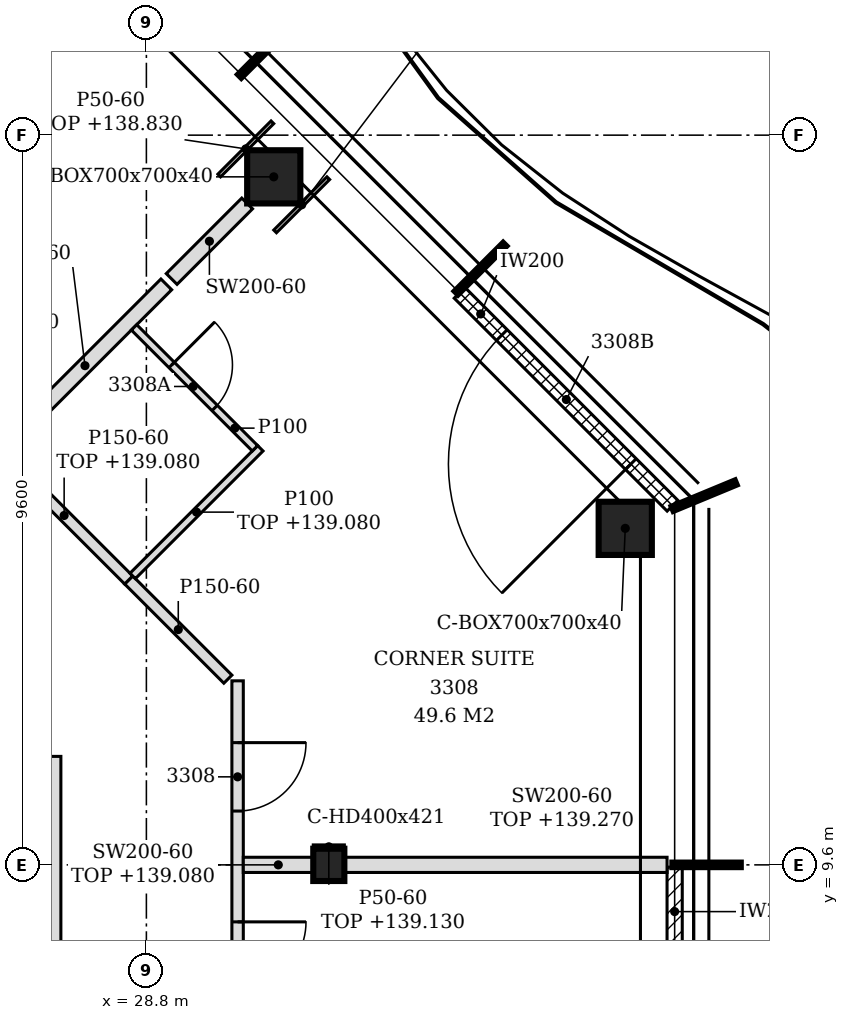
"""IFC4 building model, lengths in metres.
Left out: names, types, materials, properties, quantities, classifications, styles, units other than length and angle.
Written with IfcOpenShell. Run it as: python <this file> out.ifc"""

import sys

from ifc_helpers import new_model, si_unit, direction, frame, frame_2d, origin, origin_2d, place, context, subcontext, project, spatial, polyline, rectangle, hollow_rectangle, i_section, outline, extrude, element, fill, save


model = new_model("IFC4")
c1 = context("Model", 3, precision=1e-05, world=origin(), true_north=direction((0.0, 1.0)))
c2 = subcontext(c1, "Body", "Model", "MODEL_VIEW")
j1 = project(units=[si_unit("LENGTHUNIT", "METRE"), si_unit("PLANEANGLEUNIT", "RADIAN")], contexts=[c1])
p1 = place(None, origin())
s1 = spatial("IfcSite", under=j1, at=p1, CompositionType="ELEMENT")
p2 = place(p1, origin())
s2 = spatial("IfcBuilding", under=s1, at=p2, CompositionType="ELEMENT")
p3 = place(p2, frame((0.0, 0.0, 136.2)))
s3 = spatial("IfcBuildingStorey", under=s2, at=p3, CompositionType="ELEMENT", Elevation=136.2)
for number, where, z_axis, x_axis in (
    (1, (35.1, 14.027, -0.15), (0.0, 0.0, 1.0), (1.0, 0.0, 0.0)),
    (2, (30.476, 18.652, -0.15), (0.0, 0.0, 1.0), (1.0, 0.0, 0.0)),
):
    element("IfcColumn", number, at=place(p3, frame(where, z_axis=z_axis, x_axis=x_axis)), inside=s3, PredefinedType="COLUMN", context=c2, shape_type="SweptSolid", body=[
        extrude(hollow_rectangle(XDim=0.7, YDim=0.7, WallThickness=0.04, at=origin_2d()), origin(), (0.0, 0.0, 1.0), 3.6),
    ])
p4 = place(p3, frame((31.2, 9.6, -0.15), z_axis=(0.0, 0.0, 1.0), x_axis=(1.0, 0.0, 0.0)))
e3 = element("IfcColumn", 3, at=p4, inside=s3, PredefinedType="COLUMN", context=c2, shape_type="SweptSolid", body=[
    extrude(i_section(OverallWidth=0.409, OverallDepth=0.425, WebThickness=0.033, FlangeThickness=0.052, FilletRadius=0.015, at=origin_2d()), origin(), (0.0, 0.0, 1.0), 3.6),
])
p5 = place(p3, frame((35.75, 4.83, 0.0), z_axis=(0.0, 0.0, 1.0), x_axis=(0.0, 1.0, 0.0)))
e4 = element("IfcWall", 4, at=p5, inside=s3, PredefinedType="NOTDEFINED", context=c2, shape_type="SweptSolid", body=[
    extrude(rectangle(XDim=4.74, YDim=0.2, at=frame_2d((2.37, 0.0))), origin(), (0.0, 0.0, 1.0), 3.45),
])
p6 = place(p5, frame((1.17, 0.0, 0.0)))
e5 = element("IfcOpeningElement", 5, at=p6, cuts=e4, PredefinedType="OPENING", context=c2, shape_type="SweptSolid", body=[
    extrude(rectangle(XDim=2.4, YDim=2.4, at=frame_2d((1.2, 1.2))), frame((0.0, 0.11, 0.0), z_axis=(0.0, -1.0, 0.0), x_axis=(1.0, 0.0, 0.0)), (0.0, 0.0, 1.0), 0.22),
])
p7 = place(p3, frame((35.722, 14.325, 0.0), z_axis=(0.0, 0.0, 1.0), x_axis=(-0.707106781187, 0.707106781187, 0.0)))
e6 = element("IfcWall", 6, at=p7, inside=s3, PredefinedType="NOTDEFINED", context=c2, shape_type="SweptSolid", body=[
    extrude(rectangle(XDim=3.962, YDim=0.2, at=frame_2d((1.981, 0.0))), origin(), (0.0, 0.0, 1.0), 3.45),
])
p8 = place(p7, frame((0.775, 0.0, 0.0)))
e7 = element("IfcOpeningElement", 7, at=p8, cuts=e6, PredefinedType="OPENING", context=c2, shape_type="SweptSolid", body=[
    extrude(rectangle(XDim=2.4, YDim=2.4, at=frame_2d((1.2, 1.2))), frame((0.0, 0.11, 0.0), z_axis=(0.0, -1.0, 0.0), x_axis=(1.0, 0.0, 0.0)), (0.0, 0.0, 1.0), 0.22),
])
p9 = place(p3, frame((30.0, -0.813, 0.0), z_axis=(0.0, 0.0, 1.0), x_axis=(0.0, 1.0, 0.0)))
e8 = element("IfcWall", 8, at=p9, inside=s3, PredefinedType="PARTITIONING", context=c2, shape_type="SweptSolid", body=[
    extrude(outline(polyline([(0.0, 0.0), (12.834, 0.0), (12.834, 3.45), (10.518, 3.45), (10.516, 2.88), (10.308, 2.88), (10.306, 3.45), (5.718, 3.45), (5.716, 2.88), (5.508, 2.88), (5.506, 3.45), (0.918, 3.45), (0.916, 2.88), (0.708, 2.88), (0.706, 3.45), (0.0, 3.45), (0.0, 0.0)])), frame((0.0, 0.075, 0.0), z_axis=(0.0, -1.0, 0.0), x_axis=(1.0, 0.0, 0.0)), (0.0, 0.0, 1.0), 0.15),
])
p10 = place(p9, frame((1.563, 0.0, 0.0)))
e9 = element("IfcOpeningElement", 9, at=p10, cuts=e8, PredefinedType="OPENING", context=c2, shape_type="SweptSolid", body=[
    extrude(rectangle(XDim=0.9, YDim=2.1, at=frame_2d((0.45, 1.05))), frame((0.0, 0.085, 0.0), z_axis=(0.0, -1.0, 0.0), x_axis=(1.0, 0.0, 0.0)), (0.0, 0.0, 1.0), 0.17),
])
p11 = place(p9, frame((8.763, 0.0, 0.0)))
e10 = element("IfcOpeningElement", 10, at=p11, cuts=e8, PredefinedType="OPENING", context=c2, shape_type="SweptSolid", body=[
    extrude(rectangle(XDim=0.9, YDim=2.1, at=frame_2d((0.45, 1.05))), frame((0.0, 0.085, 0.0), z_axis=(0.0, -1.0, 0.0), x_axis=(1.0, 0.0, 0.0)), (0.0, 0.0, 1.0), 0.17),
])
p12 = place(p9, frame((11.121, 0.0, 0.0)))
e11 = element("IfcOpeningElement", 11, at=p12, cuts=e8, PredefinedType="OPENING", context=c2, shape_type="SweptSolid", body=[
    extrude(rectangle(XDim=0.9, YDim=2.1, at=frame_2d((0.45, 1.05))), frame((0.0, 0.085, 0.0), z_axis=(0.0, -1.0, 0.0), x_axis=(1.0, 0.0, 0.0)), (0.0, 0.0, 1.0), 0.17),
])
p13 = place(p3, frame((27.6, 3.675, 0.0), z_axis=(0.0, 0.0, 1.0), x_axis=(0.0, 1.0, 0.0)))
e12 = element("IfcWall", 12, at=p13, inside=s3, PredefinedType="PARTITIONING", context=c2, shape_type="SweptSolid", body=[
    extrude(outline(polyline([(0.0, 0.0), (7.352, 0.0), (7.352, 3.45), (6.03, 3.45), (6.028, 2.88), (5.82, 2.88), (5.818, 3.45), (1.23, 3.45), (1.228, 2.88), (1.02, 2.88), (1.018, 3.45), (0.0, 3.45), (0.0, 0.0)])), frame((0.0, 0.075, 0.0), z_axis=(0.0, -1.0, 0.0), x_axis=(1.0, 0.0, 0.0)), (0.0, 0.0, 1.0), 0.15),
])
p14 = place(p3, frame((30.075, 9.6, 0.0), z_axis=(0.0, 0.0, 1.0), x_axis=(1.0, 0.0, 0.0)))
e13 = element("IfcWall", 13, at=p14, inside=s3, PredefinedType="PARTITIONING", context=c2, shape_type="SweptSolid", body=[
    extrude(rectangle(XDim=0.921, YDim=0.2, at=frame_2d((0.46, 0.0))), origin(), (0.0, 0.0, 1.0), 2.88),
])
p15 = place(p3, frame((31.405, 9.6, 0.0), z_axis=(0.0, 0.0, 1.0), x_axis=(1.0, 0.0, 0.0)))
e14 = element("IfcWall", 14, at=p15, inside=s3, PredefinedType="PARTITIONING", context=c2, shape_type="SweptSolid", body=[
    extrude(outline(polyline([(0.0, 0.0), (4.245, 0.0), (4.246, 3.07), (3.845, 3.07), (3.844, 2.93), (3.545, 2.93), (3.543, 3.07), (0.0, 3.07), (0.0, 0.0)])), frame((0.0, 0.1, 0.0), z_axis=(0.0, -1.0, 0.0), x_axis=(1.0, 0.0, 0.0)), (0.0, 0.0, 1.0), 0.2),
])
p16 = place(p3, frame((29.872, 12.043, 0.0), z_axis=(0.0, 0.0, 1.0), x_axis=(-0.707172918471, 0.707040637716, 0.0)))
e15 = element("IfcWall", 15, at=p16, inside=s3, PredefinedType="PARTITIONING", context=c2, shape_type="SweptSolid", body=[
    extrude(rectangle(XDim=1.846, YDim=0.15, at=frame_2d((0.923, 0.0))), origin(), (0.0, 0.0, 1.0), 3.45),
])
p17 = place(p3, frame((28.567, 13.348, 0.0), z_axis=(0.0, 0.0, 1.0), x_axis=(-0.707310148094, 0.706903355773, 0.0)))
e16 = element("IfcWall", 16, at=p17, inside=s3, PredefinedType="PARTITIONING", context=c2, shape_type="SweptSolid", body=[
    extrude(rectangle(XDim=2.401, YDim=0.15, at=frame_2d((1.2, 0.0))), origin(), (0.0, 0.0, 1.0), 2.88),
])
p18 = place(p3, frame((28.62, 13.401, 0.0), z_axis=(0.0, 0.0, 1.0), x_axis=(0.707055379538, 0.707158179099, 0.0)))
e17 = element("IfcWall", 17, at=p18, inside=s3, PredefinedType="PARTITIONING", context=c2, shape_type="SweptSolid", body=[
    extrude(rectangle(XDim=2.375, YDim=0.1, at=frame_2d((1.188, 0.0))), origin(), (0.0, 0.0, 1.0), 2.88),
])
p19 = place(p3, frame((26.922, 15.098, 0.0), z_axis=(0.0, 0.0, 1.0), x_axis=(0.707268147401, 0.706945378138, 0.0)))
e18 = element("IfcWall", 18, at=p19, inside=s3, PredefinedType="PARTITIONING", context=c2, shape_type="SweptSolid", body=[
    extrude(rectangle(XDim=3.026, YDim=0.2, at=frame_2d((1.513, 0.0))), origin(), (0.0, 0.0, 1.0), 3.45),
])
p20 = place(p3, frame((30.229, 15.08, 0.0), z_axis=(0.0, 0.0, 1.0), x_axis=(-0.707052524, 0.70716103421, 0.0)))
e19 = element("IfcWall", 19, at=p20, inside=s3, PredefinedType="PARTITIONING", context=c2, shape_type="SweptSolid", body=[
    extrude(rectangle(XDim=2.25, YDim=0.1, at=frame_2d((1.125, 0.0))), origin(), (0.0, 0.0, 1.0), 3.45),
])
p21 = place(p20, frame((0.75, 0.0, 0.0)))
e20 = element("IfcOpeningElement", 20, at=p21, cuts=e19, PredefinedType="OPENING", context=c2, shape_type="SweptSolid", body=[
    extrude(rectangle(XDim=0.8, YDim=2.1, at=frame_2d((0.4, 1.05))), frame((0.0, 0.06, 0.0), z_axis=(0.0, -1.0, 0.0), x_axis=(1.0, 0.0, 0.0)), (0.0, 0.0, 1.0), 0.12),
])
p22 = place(p3, frame((29.133, 17.308, 0.0), z_axis=(0.0, 0.0, 1.0), x_axis=(0.70693298083, 0.707280538835, 0.0)))
e21 = element("IfcWall", 21, at=p22, inside=s3, PredefinedType="PARTITIONING", context=c2, shape_type="SweptSolid", body=[
    extrude(rectangle(XDim=1.405, YDim=0.2, at=frame_2d((0.702, 0.0))), origin(), (0.0, 0.0, 1.0), 3.45),
])
p23 = place(p3, frame((30.996, 9.837, 0.0), z_axis=(0.0, 0.0, 1.0), x_axis=(1.0, 0.0, 0.0)))
e22 = element("IfcWall", 22, at=p23, inside=s3, PredefinedType="PARTITIONING", context=c2, shape_type="SweptSolid", body=[
    extrude(rectangle(XDim=0.409, YDim=0.05, at=frame_2d((0.205, 0.0))), origin(), (0.0, 0.0, 1.0), 2.93),
])
p24 = place(p3, frame((29.758, 18.669, 0.0), z_axis=(0.0, 0.0, 1.0), x_axis=(0.706983473703, 0.707230067171, 0.0)))
e23 = element("IfcWall", 23, at=p24, inside=s3, PredefinedType="PARTITIONING", context=c2, shape_type="SweptSolid", body=[
    extrude(rectangle(XDim=0.99, YDim=0.05, at=frame_2d((0.495, 0.0))), origin(), (0.0, 0.0, 1.0), 2.63),
])
p25 = place(p3, frame((30.493, 17.934, 0.0), z_axis=(0.0, 0.0, 1.0), x_axis=(0.706983473703, 0.707230067171, 0.0)))
e24 = element("IfcWall", 24, at=p25, inside=s3, PredefinedType="PARTITIONING", context=c2, shape_type="SweptSolid", body=[
    extrude(rectangle(XDim=0.99, YDim=0.05, at=frame_2d((0.495, 0.0))), origin(), (0.0, 0.0, 1.0), 2.93),
])
p26 = place(p8, origin())
e25 = element("IfcDoor", 25, at=p26, inside=s3, OperationType="SINGLE_SWING_LEFT", PredefinedType="DOOR", context=c2, shape_type="SweptSolid", body=[
    extrude(rectangle(XDim=2.4, YDim=2.4, at=frame_2d((1.2, 1.2))), frame((0.0, 0.025, 0.0), z_axis=(0.0, -1.0, 0.0), x_axis=(1.0, 0.0, 0.0)), (0.0, 0.0, 1.0), 0.05),
])
fill(e7, e25)
p27 = place(p11, frame((0.9, 0.0, 0.0), z_axis=(0.0, 0.0, 1.0), x_axis=(-1.0, 0.0, 0.0)))
e26 = element("IfcDoor", 26, at=p27, inside=s3, OperationType="SINGLE_SWING_LEFT", PredefinedType="DOOR", context=c2, shape_type="SweptSolid", body=[
    extrude(rectangle(XDim=0.9, YDim=2.1, at=frame_2d((0.45, 1.05))), frame((0.0, 0.025, 0.0), z_axis=(0.0, -1.0, 0.0), x_axis=(1.0, 0.0, 0.0)), (0.0, 0.0, 1.0), 0.05),
])
fill(e10, e26)
p28 = place(p12, frame((0.9, 0.0, 0.0), z_axis=(0.0, 0.0, 1.0), x_axis=(-1.0, 0.0, 0.0)))
e27 = element("IfcDoor", 27, at=p28, inside=s3, OperationType="SINGLE_SWING_LEFT", PredefinedType="DOOR", context=c2, shape_type="SweptSolid", body=[
    extrude(rectangle(XDim=0.9, YDim=2.1, at=frame_2d((0.45, 1.05))), frame((0.0, 0.025, 0.0), z_axis=(0.0, -1.0, 0.0), x_axis=(1.0, 0.0, 0.0)), (0.0, 0.0, 1.0), 0.05),
])
fill(e11, e27)
p29 = place(p21, frame((0.8, 0.0, 0.0), z_axis=(0.0, 0.0, 1.0), x_axis=(-1.0, 0.0, 0.0)))
e28 = element("IfcDoor", 28, at=p29, inside=s3, OperationType="SINGLE_SWING_LEFT", PredefinedType="DOOR", context=c2, shape_type="SweptSolid", body=[
    extrude(rectangle(XDim=0.8, YDim=2.1, at=frame_2d((0.4, 1.05))), frame((0.0, 0.025, 0.0), z_axis=(0.0, -1.0, 0.0), x_axis=(1.0, 0.0, 0.0)), (0.0, 0.0, 1.0), 0.05),
])
fill(e20, e28)
save(model, sys.argv[1])
